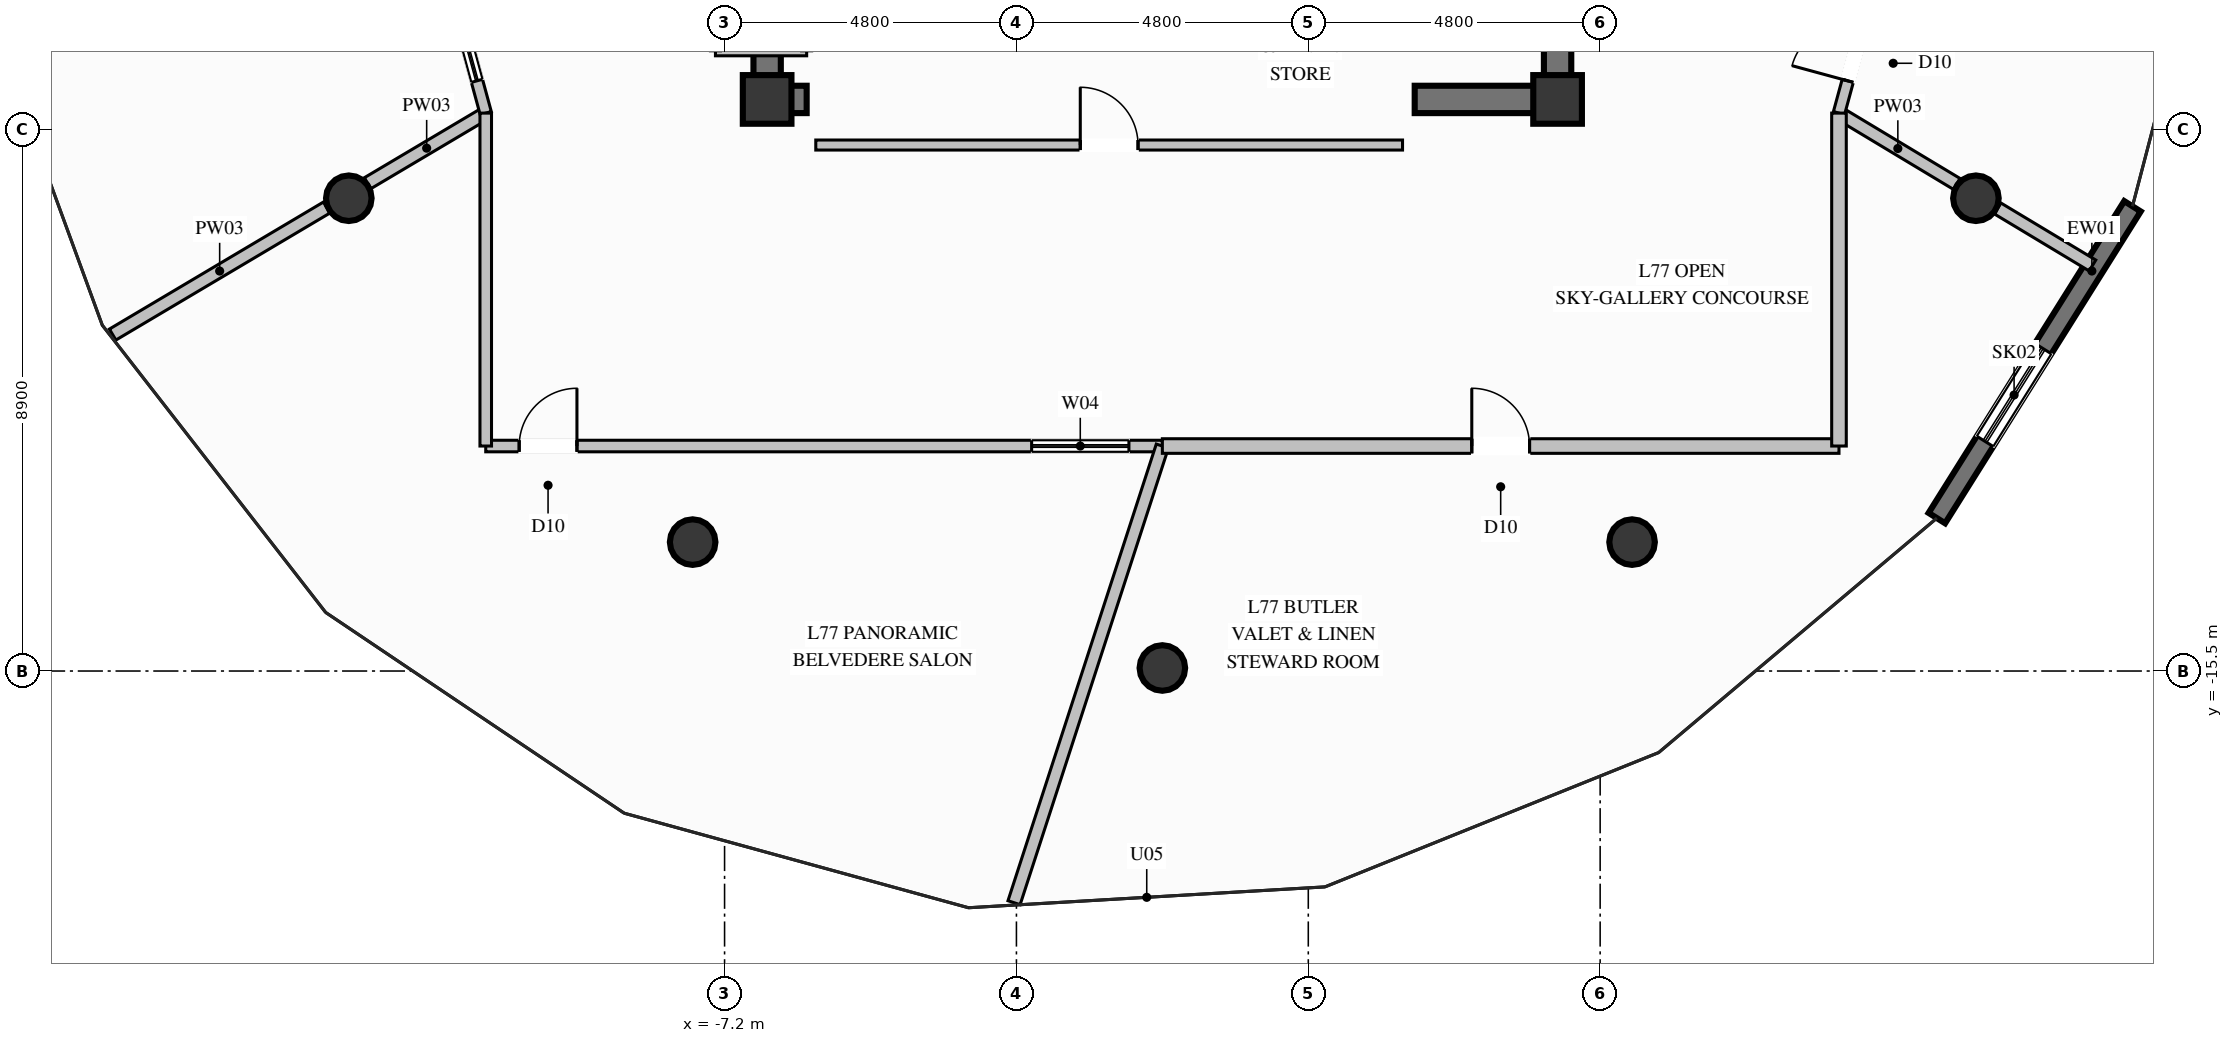
"""IFC4 building model, lengths in metres.
Left out: names, types, materials, properties, quantities, classifications, styles, units other than length and angle.
Written with IfcOpenShell. Run it as: python <this file> out.ifc"""

import sys

from ifc_helpers import new_model, si_unit, direction, frame, frame_2d, origin, origin_2d, place, context, subcontext, project, spatial, rectangle, circle, extrude, element, fill, save


model = new_model("IFC4")
c1 = context("Model", 3, precision=1e-05, world=origin(), true_north=direction((0.0, 1.0)))
c2 = subcontext(c1, "Body", "Model", "MODEL_VIEW")
j1 = project(units=[si_unit("LENGTHUNIT", "METRE"), si_unit("PLANEANGLEUNIT", "RADIAN")], contexts=[c1])
p1 = place(None, origin())
s1 = spatial("IfcSite", under=j1, at=p1, CompositionType="ELEMENT")
p2 = place(p1, origin())
s2 = spatial("IfcBuilding", under=s1, at=p2, CompositionType="ELEMENT")
p3 = place(p2, frame((0.0, 0.0, 297.2)))
s3 = spatial("IfcBuildingStorey", under=s2, at=p3, CompositionType="ELEMENT", Elevation=297.2)
for number, where, z_axis, x_axis in (
    (1, (-6.5, -6.1, 0.0), (0.0, 0.0, 1.0), (1.0, 0.0, 0.0)),
    (2, (6.5, -6.1, 0.0), (0.0, 0.0, 1.0), (1.0, 0.0, 0.0)),
):
    element("IfcColumn", number, at=place(p3, frame(where, z_axis=z_axis, x_axis=x_axis)), inside=s3, PredefinedType="COLUMN", context=c2, shape_type="SweptSolid", body=[
        extrude(rectangle(XDim=0.8, YDim=0.8, at=origin_2d()), origin(), (0.0, 0.0, 1.0), 5.0),
    ])
p4 = place(p3, frame((-6.275, -6.1, 0.0), z_axis=(0.0, 0.0, 1.0), x_axis=(1.0, 0.0, 0.0)))
e3 = element("IfcWall", 3, at=p4, inside=s3, PredefinedType="SHEAR", context=c2, shape_type="SweptSolid", body=[
    extrude(rectangle(XDim=0.425, YDim=0.45, at=frame_2d((0.212, 0.0))), origin(), (0.0, 0.0, 1.0), 5.0),
])
p5 = place(p3, frame((4.15, -6.1, 0.0), z_axis=(0.0, 0.0, 1.0), x_axis=(1.0, 0.0, 0.0)))
e4 = element("IfcWall", 4, at=p5, inside=s3, PredefinedType="SHEAR", context=c2, shape_type="SweptSolid", body=[
    extrude(rectangle(XDim=2.125, YDim=0.45, at=frame_2d((1.062, 0.0))), origin(), (0.0, 0.0, 1.0), 5.0),
])
p6 = place(p3, frame((-6.5, -6.325, 0.0), z_axis=(0.0, 0.0, 1.0), x_axis=(0.0, 1.0, 0.0)))
e5 = element("IfcWall", 5, at=p6, inside=s3, PredefinedType="SHEAR", context=c2, shape_type="SweptSolid", body=[
    extrude(rectangle(XDim=2.975, YDim=0.45, at=frame_2d((1.487, 0.0))), origin(), (0.0, 0.0, 1.0), 5.0),
])
p7 = place(p3, frame((6.5, -6.325, 0.0), z_axis=(0.0, 0.0, 1.0), x_axis=(0.0, 1.0, 0.0)))
e6 = element("IfcWall", 6, at=p7, inside=s3, PredefinedType="SHEAR", context=c2, shape_type="SweptSolid", body=[
    extrude(rectangle(XDim=3.975, YDim=0.45, at=frame_2d((1.987, 0.0))), origin(), (0.0, 0.0, 1.0), 5.0),
])
for number, where, z_axis, x_axis in (
    (7, (-13.38, -7.725, 0.0), (0.0, 0.0, 1.0), (1.0, 0.0, 0.0)),
    (8, (-7.725, -13.38, 0.0), (0.0, 0.0, 1.0), (1.0, 0.0, 0.0)),
    (9, (0.0, -15.45, 0.0), (0.0, 0.0, 1.0), (1.0, 0.0, 0.0)),
    (10, (7.725, -13.38, 0.0), (0.0, 0.0, 1.0), (1.0, 0.0, 0.0)),
    (11, (13.38, -7.725, 0.0), (0.0, 0.0, 1.0), (1.0, 0.0, 0.0)),
):
    element("IfcColumn", number, at=place(p3, frame(where, z_axis=z_axis, x_axis=x_axis)), inside=s3, PredefinedType="COLUMN", context=c2, shape_type="SweptSolid", body=[
        extrude(circle(Radius=0.375, at=origin_2d()), origin(), (0.0, 0.0, 1.0), 5.0),
    ])
p8 = place(p3, frame((15.955, -7.857, 0.0), z_axis=(0.0, 0.0, 1.0), x_axis=(-0.53141560639, -0.847111240207, 0.0)))
e12 = element("IfcWall", 12, at=p8, inside=s3, PredefinedType="SOLIDWALL", context=c2, shape_type="SweptSolid", body=[
    extrude(rectangle(XDim=6.054, YDim=0.32, at=frame_2d((3.027, 0.0))), origin(), (0.0, 0.0, 1.0), 4.72),
])
p9 = place(p8, frame((2.764, 0.0, 0.6)))
e13 = element("IfcOpeningElement", 13, at=p9, cuts=e12, PredefinedType="OPENING", context=c2, shape_type="SweptSolid", body=[
    extrude(rectangle(XDim=1.8, YDim=2.2, at=frame_2d((0.9, 1.1))), frame((0.0, 0.17, 0.0), z_axis=(0.0, -1.0, 0.0), x_axis=(1.0, 0.0, 0.0)), (0.0, 0.0, 1.0), 0.34),
])
p10 = place(p3, frame((-7.35, -5.3, 0.0), z_axis=(0.0, 0.0, 1.0), x_axis=(1.0, 0.0, 0.0)))
e14 = element("IfcWall", 14, at=p10, inside=s3, PredefinedType="PARTITIONING", context=c2, shape_type="SweptSolid", body=[
    extrude(rectangle(XDim=1.5, YDim=0.165, at=frame_2d((0.75, 0.0))), origin(), (0.0, 0.0, 1.0), 2.905),
])
p11 = place(p3, frame((-5.7, -6.85, 0.0), z_axis=(0.0, 0.0, 1.0), x_axis=(1.0, 0.0, 0.0)))
e15 = element("IfcWall", 15, at=p11, inside=s3, PredefinedType="PARTITIONING", context=c2, shape_type="SweptSolid", body=[
    extrude(rectangle(XDim=9.65, YDim=0.165, at=frame_2d((4.825, 0.0))), origin(), (0.0, 0.0, 1.0), 2.905),
])
p12 = place(p11, frame((4.35, 0.0, 0.0)))
e16 = element("IfcOpeningElement", 16, at=p12, cuts=e15, PredefinedType="OPENING", context=c2, shape_type="SweptSolid", body=[
    extrude(rectangle(XDim=0.95, YDim=2.1, at=frame_2d((0.475, 1.05))), frame((0.0, 0.093, 0.0), z_axis=(0.0, -1.0, 0.0), x_axis=(1.0, 0.0, 0.0)), (0.0, 0.0, 1.0), 0.185),
])
p13 = place(p3, frame((-11.128, -6.325, 0.0), z_axis=(0.0, 0.0, 1.0), x_axis=(-0.859980712554, -0.510326536675, 0.0)))
e17 = element("IfcWall", 17, at=p13, inside=s3, PredefinedType="PARTITIONING", context=c2, shape_type="SweptSolid", body=[
    extrude(rectangle(XDim=2.26, YDim=0.21, at=frame_2d((1.13, 0.0))), origin(), (0.0, 0.0, 1.0), 2.905),
])
p14 = place(p3, frame((-13.744, -7.878, 0.0), z_axis=(0.0, 0.0, 1.0), x_axis=(-0.859951278994, -0.510376133608, 0.0)))
e18 = element("IfcWall", 18, at=p14, inside=s3, PredefinedType="PARTITIONING", context=c2, shape_type="SweptSolid", body=[
    extrude(rectangle(XDim=4.093, YDim=0.21, at=frame_2d((2.047, 0.0))), origin(), (0.0, 0.0, 1.0), 4.72),
])
p15 = place(p3, frame((11.128, -6.325, 0.0), z_axis=(0.0, 0.0, 1.0), x_axis=(0.857015766595, -0.515290186018, 0.0)))
e19 = element("IfcWall", 19, at=p15, inside=s3, PredefinedType="PARTITIONING", context=c2, shape_type="SweptSolid", body=[
    extrude(rectangle(XDim=2.259, YDim=0.21, at=frame_2d((1.129, 0.0))), origin(), (0.0, 0.0, 1.0), 2.905),
])
p16 = place(p3, frame((13.737, -7.893, 0.0), z_axis=(0.0, 0.0, 1.0), x_axis=(0.857019202275, -0.515284471853, 0.0)))
e20 = element("IfcWall", 20, at=p16, inside=s3, PredefinedType="PARTITIONING", context=c2, shape_type="SweptSolid", body=[
    extrude(rectangle(XDim=1.82, YDim=0.21, at=frame_2d((0.91, 0.0))), origin(), (0.0, 0.0, 1.0), 4.72),
])
p17 = place(p3, frame((-12.85, 0.0, 0.0), z_axis=(0.0, 0.0, 1.0), x_axis=(0.262717156474, -0.964872890952, 0.0)))
e21 = element("IfcWall", 21, at=p17, inside=s3, PredefinedType="PARTITIONING", context=c2, shape_type="SweptSolid", body=[
    extrude(rectangle(XDim=6.555, YDim=0.19, at=frame_2d((3.278, 0.0))), origin(), (0.0, 0.0, 1.0), 4.72),
])
p18 = place(p17, frame((0.55, 0.0, 0.0)))
e22 = element("IfcOpeningElement", 22, at=p18, cuts=e21, PredefinedType="OPENING", context=c2, shape_type="SweptSolid", body=[
    extrude(rectangle(XDim=0.95, YDim=2.1, at=frame_2d((0.475, 1.05))), frame((0.0, 0.105, 0.0), z_axis=(0.0, -1.0, 0.0), x_axis=(1.0, 0.0, 0.0)), (0.0, 0.0, 1.0), 0.21),
])
p19 = place(p17, frame((4.405, 0.0, 0.9)))
e23 = element("IfcOpeningElement", 23, at=p19, cuts=e21, PredefinedType="OPENING", context=c2, shape_type="SweptSolid", body=[
    extrude(rectangle(XDim=1.6, YDim=1.4, at=frame_2d((0.8, 0.7))), frame((0.0, 0.105, 0.0), z_axis=(0.0, -1.0, 0.0), x_axis=(1.0, 0.0, 0.0)), (0.0, 0.0, 1.0), 0.21),
])
p20 = place(p3, frame((11.128, -6.325, 0.0), z_axis=(0.0, 0.0, 1.0), x_axis=(0.262717156474, 0.964872890952, 0.0)))
e24 = element("IfcWall", 24, at=p20, inside=s3, PredefinedType="PARTITIONING", context=c2, shape_type="SweptSolid", body=[
    extrude(rectangle(XDim=6.555, YDim=0.19, at=frame_2d((3.278, 0.0))), origin(), (0.0, 0.0, 1.0), 4.72),
])
p21 = place(p20, frame((0.55, 0.0, 0.0)))
e25 = element("IfcOpeningElement", 25, at=p21, cuts=e24, PredefinedType="OPENING", context=c2, shape_type="SweptSolid", body=[
    extrude(rectangle(XDim=0.95, YDim=2.1, at=frame_2d((0.475, 1.05))), frame((0.0, 0.105, 0.0), z_axis=(0.0, -1.0, 0.0), x_axis=(1.0, 0.0, 0.0)), (0.0, 0.0, 1.0), 0.21),
])
p22 = place(p20, frame((4.405, 0.0, 0.9)))
e26 = element("IfcOpeningElement", 26, at=p22, cuts=e24, PredefinedType="OPENING", context=c2, shape_type="SweptSolid", body=[
    extrude(rectangle(XDim=1.6, YDim=1.4, at=frame_2d((0.8, 0.7))), frame((0.0, 0.105, 0.0), z_axis=(0.0, -1.0, 0.0), x_axis=(1.0, 0.0, 0.0)), (0.0, 0.0, 1.0), 0.21),
])
p23 = place(p3, frame((-11.128, -11.8, 0.0), z_axis=(0.0, 0.0, 1.0), x_axis=(1.0, 0.0, 0.0)))
e27 = element("IfcWall", 27, at=p23, inside=s3, PredefinedType="PARTITIONING", context=c2, shape_type="SweptSolid", body=[
    extrude(rectangle(XDim=11.128, YDim=0.19, at=frame_2d((5.564, 0.0))), origin(), (0.0, 0.0, 1.0), 4.72),
])
p24 = place(p23, frame((0.55, 0.0, 0.0)))
e28 = element("IfcOpeningElement", 28, at=p24, cuts=e27, PredefinedType="OPENING", context=c2, shape_type="SweptSolid", body=[
    extrude(rectangle(XDim=0.95, YDim=2.1, at=frame_2d((0.475, 1.05))), frame((0.0, 0.105, 0.0), z_axis=(0.0, -1.0, 0.0), x_axis=(1.0, 0.0, 0.0)), (0.0, 0.0, 1.0), 0.21),
])
p25 = place(p23, frame((8.978, 0.0, 0.9)))
e29 = element("IfcOpeningElement", 29, at=p25, cuts=e27, PredefinedType="OPENING", context=c2, shape_type="SweptSolid", body=[
    extrude(rectangle(XDim=1.6, YDim=1.4, at=frame_2d((0.8, 0.7))), frame((0.0, 0.105, 0.0), z_axis=(0.0, -1.0, 0.0), x_axis=(1.0, 0.0, 0.0)), (0.0, 0.0, 1.0), 0.21),
])
p26 = place(p3, frame((-11.128, -6.325, 0.0), z_axis=(0.0, 0.0, 1.0), x_axis=(0.0, -1.0, 0.0)))
e30 = element("IfcWall", 30, at=p26, inside=s3, PredefinedType="PARTITIONING", context=c2, shape_type="SweptSolid", body=[
    extrude(rectangle(XDim=5.475, YDim=0.19, at=frame_2d((2.738, 0.0))), origin(), (0.0, 0.0, 1.0), 4.72),
])
p27 = place(p3, frame((0.0, -11.8, 0.0), z_axis=(0.0, 0.0, 1.0), x_axis=(-0.308881219967, -0.95110062136, 0.0)))
e31 = element("IfcWall", 31, at=p27, inside=s3, PredefinedType="PARTITIONING", context=c2, shape_type="SweptSolid", body=[
    extrude(rectangle(XDim=7.896, YDim=0.21, at=frame_2d((3.948, 0.0))), origin(), (0.0, 0.0, 1.0), 2.905),
])
p28 = place(p3, frame((0.0, -11.8, 0.0), z_axis=(0.0, 0.0, 1.0), x_axis=(1.0, 0.0, 0.0)))
e32 = element("IfcWall", 32, at=p28, inside=s3, PredefinedType="PARTITIONING", context=c2, shape_type="SweptSolid", body=[
    extrude(rectangle(XDim=11.128, YDim=0.24, at=frame_2d((5.564, 0.0))), origin(), (0.0, 0.0, 1.0), 4.72),
])
p29 = place(p28, frame((5.089, 0.0, 0.0)))
e33 = element("IfcOpeningElement", 33, at=p29, cuts=e32, PredefinedType="OPENING", context=c2, shape_type="SweptSolid", body=[
    extrude(rectangle(XDim=0.95, YDim=2.1, at=frame_2d((0.475, 1.05))), frame((0.0, 0.13, 0.0), z_axis=(0.0, -1.0, 0.0), x_axis=(1.0, 0.0, 0.0)), (0.0, 0.0, 1.0), 0.26),
])
p30 = place(p3, frame((11.128, -11.8, 0.0), z_axis=(0.0, 0.0, 1.0), x_axis=(0.0, 1.0, 0.0)))
e34 = element("IfcWall", 34, at=p30, inside=s3, PredefinedType="PARTITIONING", context=c2, shape_type="SweptSolid", body=[
    extrude(rectangle(XDim=5.475, YDim=0.24, at=frame_2d((2.738, 0.0))), origin(), (0.0, 0.0, 1.0), 4.72),
])
p31 = place(p9, origin())
e35 = element("IfcWindow", 35, at=p31, inside=s3, PartitioningType="SINGLE_PANEL", PredefinedType="SKYLIGHT", context=c2, shape_type="SweptSolid", body=[
    extrude(rectangle(XDim=1.8, YDim=2.2, at=frame_2d((0.9, 1.1))), frame((0.0, 0.03, 0.0), z_axis=(0.0, -1.0, 0.0), x_axis=(1.0, 0.0, 0.0)), (0.0, 0.0, 1.0), 0.06),
])
fill(e13, e35)
p32 = place(p12, origin())
e36 = element("IfcDoor", 36, at=p32, inside=s3, OperationType="SINGLE_SWING_LEFT", PredefinedType="DOOR", context=c2, shape_type="SweptSolid", body=[
    extrude(rectangle(XDim=0.95, YDim=2.1, at=frame_2d((0.475, 1.05))), frame((0.0, 0.025, 0.0), z_axis=(0.0, -1.0, 0.0), x_axis=(1.0, 0.0, 0.0)), (0.0, 0.0, 1.0), 0.05),
])
fill(e16, e36)
p33 = place(p19, origin())
e37 = element("IfcWindow", 37, at=p33, inside=s3, PartitioningType="SINGLE_PANEL", PredefinedType="WINDOW", context=c2, shape_type="SweptSolid", body=[
    extrude(rectangle(XDim=1.6, YDim=1.4, at=frame_2d((0.8, 0.7))), frame((0.0, 0.03, 0.0), z_axis=(0.0, -1.0, 0.0), x_axis=(1.0, 0.0, 0.0)), (0.0, 0.0, 1.0), 0.06),
])
fill(e23, e37)
p34 = place(p21, origin())
e38 = element("IfcDoor", 38, at=p34, inside=s3, OperationType="SINGLE_SWING_LEFT", PredefinedType="DOOR", context=c2, shape_type="SweptSolid", body=[
    extrude(rectangle(XDim=0.95, YDim=2.1, at=frame_2d((0.475, 1.05))), frame((0.0, 0.025, 0.0), z_axis=(0.0, -1.0, 0.0), x_axis=(1.0, 0.0, 0.0)), (0.0, 0.0, 1.0), 0.05),
])
fill(e25, e38)
p35 = place(p24, origin())
e39 = element("IfcDoor", 39, at=p35, inside=s3, OperationType="SINGLE_SWING_RIGHT", PredefinedType="DOOR", context=c2, shape_type="SweptSolid", body=[
    extrude(rectangle(XDim=0.95, YDim=2.1, at=frame_2d((0.475, 1.05))), frame((0.0, 0.025, 0.0), z_axis=(0.0, -1.0, 0.0), x_axis=(1.0, 0.0, 0.0)), (0.0, 0.0, 1.0), 0.05),
])
fill(e28, e39)
p36 = place(p25, origin())
e40 = element("IfcWindow", 40, at=p36, inside=s3, PartitioningType="SINGLE_PANEL", PredefinedType="WINDOW", context=c2, shape_type="SweptSolid", body=[
    extrude(rectangle(XDim=1.6, YDim=1.4, at=frame_2d((0.8, 0.7))), frame((0.0, 0.03, 0.0), z_axis=(0.0, -1.0, 0.0), x_axis=(1.0, 0.0, 0.0)), (0.0, 0.0, 1.0), 0.06),
])
fill(e29, e40)
p37 = place(p29, origin())
e41 = element("IfcDoor", 41, at=p37, inside=s3, OperationType="SINGLE_SWING_LEFT", PredefinedType="DOOR", context=c2, shape_type="SweptSolid", body=[
    extrude(rectangle(XDim=0.95, YDim=2.1, at=frame_2d((0.475, 1.05))), frame((0.0, 0.025, 0.0), z_axis=(0.0, -1.0, 0.0), x_axis=(1.0, 0.0, 0.0)), (0.0, 0.0, 1.0), 0.05),
])
fill(e33, e41)
save(model, sys.argv[1])
